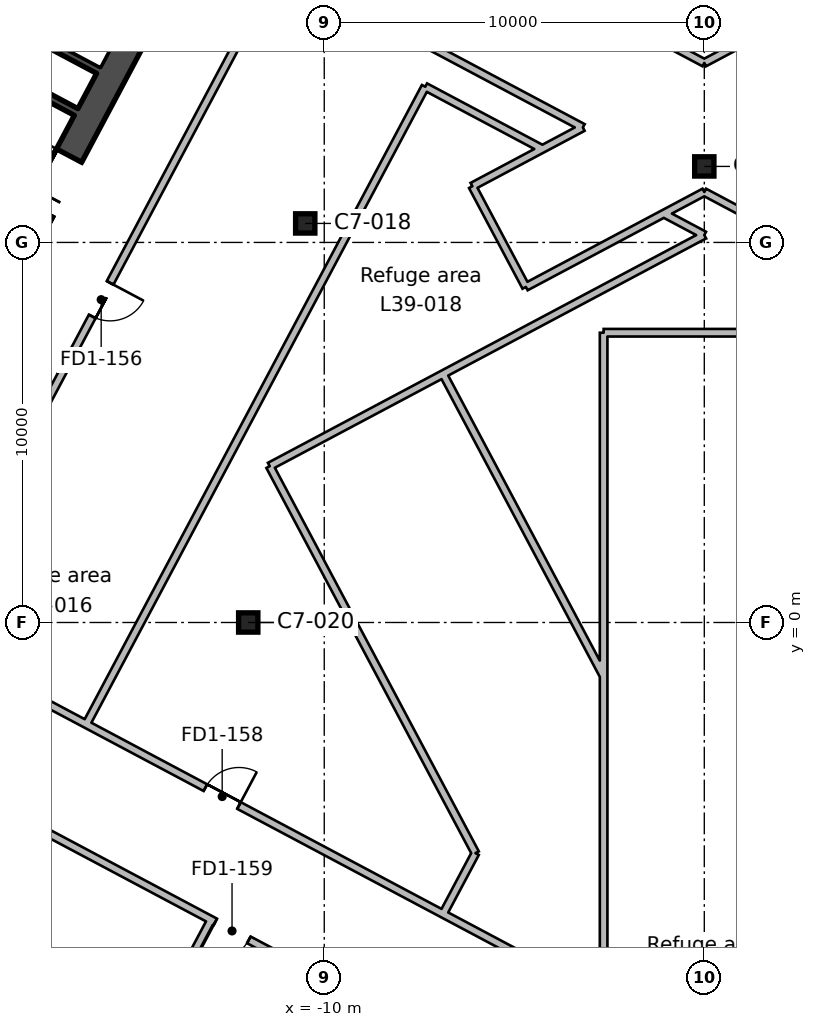
"""IFC4 building model, lengths in metres.
Left out: names, types, materials, properties, quantities, classifications, styles, units other than length and angle.
Written with IfcOpenShell. Run it as: python <this file> out.ifc"""

import sys

from ifc_helpers import new_model, si_unit, direction, frame, frame_2d, origin, origin_2d, place, context, subcontext, project, spatial, rectangle, hollow_rectangle, extrude, element, fill, save


model = new_model("IFC4")
c1 = context("Model", 3, precision=1e-05, world=origin(), true_north=direction((0.0, 1.0)))
c2 = subcontext(c1, "Body", "Model", "MODEL_VIEW")
j1 = project(units=[si_unit("LENGTHUNIT", "METRE"), si_unit("PLANEANGLEUNIT", "RADIAN")], contexts=[c1])
p1 = place(None, origin())
s1 = spatial("IfcSite", under=j1, at=p1, CompositionType="ELEMENT")
p2 = place(p1, origin())
s2 = spatial("IfcBuilding", under=s1, at=p2, CompositionType="ELEMENT")
p3 = place(p2, frame((0.0, 0.0, 183.6)))
s3 = spatial("IfcBuildingStorey", under=s2, at=p3, CompositionType="ELEMENT", Elevation=183.6)
for number, where, z_axis, x_axis in (
    (1, (-12.0, 0.0, 0.0), (0.0, 0.0, 1.0), (1.0, 0.0, 0.0)),
    (2, (-10.5, 10.5, 0.0), (0.0, 0.0, 1.0), (1.0, 0.0, 0.0)),
    (3, (0.0, 12.0, 0.0), (0.0, 0.0, 1.0), (1.0, 0.0, 0.0)),
):
    element("IfcColumn", number, at=place(p3, frame(where, z_axis=z_axis, x_axis=x_axis)), inside=s3, PredefinedType="COLUMN", context=c2, shape_type="SweptSolid", body=[
        extrude(hollow_rectangle(XDim=0.508, YDim=0.508, WallThickness=0.012, InnerFilletRadius=0.006, OuterFilletRadius=0.018, at=origin_2d()), origin(), (0.0, 0.0, 1.0), 6.0),
    ])
p4 = place(p3, frame((-13.498, 18.333, 0.0), z_axis=(0.0, 0.0, 1.0), x_axis=(-0.469469918705, -0.88294846703, 0.0)))
e4 = element("IfcWall", 4, at=p4, inside=s3, PredefinedType="SHEAR", context=c2, shape_type="SweptSolid", body=[
    extrude(rectangle(XDim=19.7, YDim=0.75, at=frame_2d((9.85, 0.0))), origin(), (0.0, 0.0, 1.0), 6.0),
])
p5 = place(p4, frame((6.85, 0.0, 0.0)))
e5 = element("IfcOpeningElement", 5, at=p5, cuts=e4, PredefinedType="OPENING", context=c2, shape_type="SweptSolid", body=[
    extrude(rectangle(XDim=2.4, YDim=2.4, at=frame_2d((1.2, 1.2))), frame((0.0, 0.385, 0.0), z_axis=(0.0, -1.0, 0.0), x_axis=(1.0, 0.0, 0.0)), (0.0, 0.0, 1.0), 0.77),
])
p6 = place(p3, frame((-15.942, 14.536, 0.0), z_axis=(0.0, 0.0, 1.0), x_axis=(-0.882946947542, 0.469472776449, 0.0)))
e6 = element("IfcWall", 6, at=p6, inside=s3, PredefinedType="SHEAR", context=c2, shape_type="SweptSolid", body=[
    extrude(rectangle(XDim=8.0, YDim=0.2, at=frame_2d((4.0, 0.0))), origin(), (0.0, 0.0, 1.0), 6.0),
])
p7 = place(p3, frame((-16.529, 13.432, 0.0), z_axis=(0.0, 0.0, 1.0), x_axis=(-0.88295287151, 0.469461634952, 0.0)))
e7 = element("IfcWall", 7, at=p7, inside=s3, PredefinedType="SHEAR", context=c2, shape_type="SweptSolid", body=[
    extrude(rectangle(XDim=8.0, YDim=0.2, at=frame_2d((4.0, 0.0))), origin(), (0.0, 0.0, 1.0), 6.0),
])
p8 = place(p3, frame((-47.73, 40.102, 0.0), z_axis=(0.0, 0.0, 1.0), x_axis=(0.882942458257, -0.469481219441, 0.0)))
e8 = element("IfcWall", 8, at=p8, inside=s3, PredefinedType="PARTITIONING", context=c2, shape_type="SweptSolid", body=[
    extrude(rectangle(XDim=54.058, YDim=0.2, at=frame_2d((27.029, 0.0))), origin(), (0.0, 0.0, 1.0), 5.55),
])
p9 = place(p8, frame((38.665, 0.0, 0.0)))
e9 = element("IfcOpeningElement", 9, at=p9, cuts=e8, PredefinedType="OPENING", context=c2, shape_type="SweptSolid", body=[
    extrude(rectangle(XDim=1.0, YDim=2.1, at=frame_2d((0.5, 1.05))), frame((0.0, 0.11, 0.0), z_axis=(0.0, -1.0, 0.0), x_axis=(1.0, 0.0, 0.0)), (0.0, 0.0, 1.0), 0.22),
])
p10 = place(p8, frame((26.766, 0.0, 0.0)))
e10 = element("IfcOpeningElement", 10, at=p10, cuts=e8, PredefinedType="OPENING", context=c2, shape_type="SweptSolid", body=[
    extrude(rectangle(XDim=1.0, YDim=2.1, at=frame_2d((0.5, 1.05))), frame((0.0, 0.11, 0.0), z_axis=(0.0, -1.0, 0.0), x_axis=(1.0, 0.0, 0.0)), (0.0, 0.0, 1.0), 0.22),
])
p11 = place(p8, frame((20.465, 0.0, 0.0)))
e11 = element("IfcOpeningElement", 11, at=p11, cuts=e8, PredefinedType="OPENING", context=c2, shape_type="SweptSolid", body=[
    extrude(rectangle(XDim=1.0, YDim=2.1, at=frame_2d((0.5, 1.05))), frame((0.0, 0.11, 0.0), z_axis=(0.0, -1.0, 0.0), x_axis=(1.0, 0.0, 0.0)), (0.0, 0.0, 1.0), 0.22),
])
p12 = place(p8, frame((14.866, 0.0, 0.0)))
e12 = element("IfcOpeningElement", 12, at=p12, cuts=e8, PredefinedType="OPENING", context=c2, shape_type="SweptSolid", body=[
    extrude(rectangle(XDim=1.0, YDim=2.1, at=frame_2d((0.5, 1.05))), frame((0.0, 0.11, 0.0), z_axis=(0.0, -1.0, 0.0), x_axis=(1.0, 0.0, 0.0)), (0.0, 0.0, 1.0), 0.22),
])
p13 = place(p3, frame((0.0, 14.723, 0.0), z_axis=(0.0, 0.0, 1.0), x_axis=(0.882950329887, 0.469466415149, 0.0)))
e13 = element("IfcWall", 13, at=p13, inside=s3, PredefinedType="PARTITIONING", context=c2, shape_type="SweptSolid", body=[
    extrude(rectangle(XDim=49.288, YDim=0.2, at=frame_2d((24.644, 0.0))), origin(), (0.0, 0.0, 1.0), 5.55),
])
p14 = place(p13, frame((23.95, 0.0, 0.0)))
e14 = element("IfcOpeningElement", 14, at=p14, cuts=e13, PredefinedType="OPENING", context=c2, shape_type="SweptSolid", body=[
    extrude(rectangle(XDim=1.0, YDim=2.1, at=frame_2d((0.5, 1.05))), frame((0.0, 0.11, 0.0), z_axis=(0.0, -1.0, 0.0), x_axis=(1.0, 0.0, 0.0)), (0.0, 0.0, 1.0), 0.22),
])
p15 = place(p13, frame((17.95, 0.0, 0.0)))
e15 = element("IfcOpeningElement", 15, at=p15, cuts=e13, PredefinedType="OPENING", context=c2, shape_type="SweptSolid", body=[
    extrude(rectangle(XDim=1.0, YDim=2.1, at=frame_2d((0.5, 1.05))), frame((0.0, 0.11, 0.0), z_axis=(0.0, -1.0, 0.0), x_axis=(1.0, 0.0, 0.0)), (0.0, 0.0, 1.0), 0.22),
])
p16 = place(p13, frame((13.55, 0.0, 0.0)))
e16 = element("IfcOpeningElement", 16, at=p16, cuts=e13, PredefinedType="OPENING", context=c2, shape_type="SweptSolid", body=[
    extrude(rectangle(XDim=1.0, YDim=2.1, at=frame_2d((0.5, 1.05))), frame((0.0, 0.11, 0.0), z_axis=(0.0, -1.0, 0.0), x_axis=(1.0, 0.0, 0.0)), (0.0, 0.0, 1.0), 0.22),
])
p17 = place(p3, frame((-8.144, -10.393, 0.0), z_axis=(0.0, 0.0, 1.0), x_axis=(-0.882945087791, 0.469476274102, 0.0)))
e17 = element("IfcWall", 17, at=p17, inside=s3, PredefinedType="PARTITIONING", context=c2, shape_type="SweptSolid", body=[
    extrude(rectangle(XDim=43.66, YDim=0.2, at=frame_2d((21.83, 0.0))), origin(), (0.0, 0.0, 1.0), 5.55),
])
p18 = place(p17, frame((32.25, 0.0, 0.0)))
e18 = element("IfcOpeningElement", 18, at=p18, cuts=e17, PredefinedType="OPENING", context=c2, shape_type="SweptSolid", body=[
    extrude(rectangle(XDim=1.0, YDim=2.1, at=frame_2d((0.5, 1.05))), frame((0.0, 0.11, 0.0), z_axis=(0.0, -1.0, 0.0), x_axis=(1.0, 0.0, 0.0)), (0.0, 0.0, 1.0), 0.22),
])
p19 = place(p17, frame((21.35, 0.0, 0.0)))
e19 = element("IfcOpeningElement", 19, at=p19, cuts=e17, PredefinedType="OPENING", context=c2, shape_type="SweptSolid", body=[
    extrude(rectangle(XDim=1.0, YDim=2.1, at=frame_2d((0.5, 1.05))), frame((0.0, 0.11, 0.0), z_axis=(0.0, -1.0, 0.0), x_axis=(1.0, 0.0, 0.0)), (0.0, 0.0, 1.0), 0.22),
])
p20 = place(p17, frame((14.95, 0.0, 0.0)))
e20 = element("IfcOpeningElement", 20, at=p20, cuts=e17, PredefinedType="OPENING", context=c2, shape_type="SweptSolid", body=[
    extrude(rectangle(XDim=1.0, YDim=2.1, at=frame_2d((0.5, 1.05))), frame((0.0, 0.11, 0.0), z_axis=(0.0, -1.0, 0.0), x_axis=(1.0, 0.0, 0.0)), (0.0, 0.0, 1.0), 0.22),
])
p21 = place(p17, frame((4.35, 0.0, 0.0)))
e21 = element("IfcOpeningElement", 21, at=p21, cuts=e17, PredefinedType="OPENING", context=c2, shape_type="SweptSolid", body=[
    extrude(rectangle(XDim=1.0, YDim=2.1, at=frame_2d((0.5, 1.05))), frame((0.0, 0.11, 0.0), z_axis=(0.0, -1.0, 0.0), x_axis=(1.0, 0.0, 0.0)), (0.0, 0.0, 1.0), 0.22),
])
p22 = place(p3, frame((-12.976, -7.824, 0.0), z_axis=(0.0, 0.0, 1.0), x_axis=(-0.469498413518, -0.882933315548, 0.0)))
e22 = element("IfcWall", 22, at=p22, inside=s3, PredefinedType="PARTITIONING", context=c2, shape_type="SweptSolid", body=[
    extrude(rectangle(XDim=8.2, YDim=0.2, at=frame_2d((4.1, 0.0))), origin(), (0.0, 0.0, 1.0), 5.55),
])
p23 = place(p3, frame((-15.353, -0.97, 0.0), z_axis=(0.0, 0.0, 1.0), x_axis=(0.469461347352, 0.882953024426, 0.0)))
e23 = element("IfcWall", 23, at=p23, inside=s3, PredefinedType="PARTITIONING", context=c2, shape_type="SweptSolid", body=[
    extrude(rectangle(XDim=17.064, YDim=0.2, at=frame_2d((8.532, 0.0))), origin(), (0.0, 0.0, 1.0), 5.55),
])
p24 = place(p3, frame((-7.342, 14.097, 0.0), z_axis=(0.0, 0.0, 1.0), x_axis=(0.883005616924, -0.469362419118, 0.0)))
e24 = element("IfcWall", 24, at=p24, inside=s3, PredefinedType="PARTITIONING", context=c2, shape_type="SweptSolid", body=[
    extrude(rectangle(XDim=3.475, YDim=0.2, at=frame_2d((1.737, 0.0))), origin(), (0.0, 0.0, 1.0), 5.55),
])
p25 = place(p3, frame((-15.353, -0.97, 0.0), z_axis=(0.0, 0.0, 1.0), x_axis=(-0.469573229387, -0.88289352826, 0.0)))
e25 = element("IfcWall", 25, at=p25, inside=s3, PredefinedType="PARTITIONING", context=c2, shape_type="SweptSolid", body=[
    extrude(rectangle(XDim=1.936, YDim=0.2, at=frame_2d((0.968, 0.0))), origin(), (0.0, 0.0, 1.0), 5.55),
])
p26 = place(p3, frame((-20.588, -0.379, 0.0), z_axis=(0.0, 0.0, 1.0), x_axis=(0.469489882812, 0.882937851685, 0.0)))
e26 = element("IfcWall", 26, at=p26, inside=s3, PredefinedType="PARTITIONING", context=c2, shape_type="SweptSolid", body=[
    extrude(rectangle(XDim=20.0, YDim=0.2, at=frame_2d((10.0, 0.0))), origin(), (0.0, 0.0, 1.0), 5.55),
])
p27 = place(p26, frame((9.55, 0.0, 0.0)))
e27 = element("IfcOpeningElement", 27, at=p27, cuts=e26, PredefinedType="OPENING", context=c2, shape_type="SweptSolid", body=[
    extrude(rectangle(XDim=1.0, YDim=2.1, at=frame_2d((0.5, 1.05))), frame((0.0, 0.11, 0.0), z_axis=(0.0, -1.0, 0.0), x_axis=(1.0, 0.0, 0.0)), (0.0, 0.0, 1.0), 0.22),
])
p28 = place(p3, frame((-11.198, 17.28, 0.0), z_axis=(0.0, 0.0, 1.0), x_axis=(0.882952451638, -0.469462424637, 0.0)))
e28 = element("IfcWall", 28, at=p28, inside=s3, PredefinedType="PARTITIONING", context=c2, shape_type="SweptSolid", body=[
    extrude(rectangle(XDim=9.064, YDim=0.2, at=frame_2d((4.532, 0.0))), origin(), (0.0, 0.0, 1.0), 5.55),
])
p29 = place(p3, frame((-6.873, 6.538, 0.0), z_axis=(0.0, 0.0, 1.0), x_axis=(-0.882996997183, -0.469378634969, 0.0)))
e29 = element("IfcWall", 29, at=p29, inside=s3, PredefinedType="PARTITIONING", context=c2, shape_type="SweptSolid", body=[
    extrude(rectangle(XDim=5.167, YDim=0.2, at=frame_2d((2.583, 0.0))), origin(), (0.0, 0.0, 1.0), 5.55),
])
p30 = place(p3, frame((-11.435, 4.113, 0.0), z_axis=(0.0, 0.0, 1.0), x_axis=(0.469480251476, -0.882942972946, 0.0)))
e30 = element("IfcWall", 30, at=p30, inside=s3, PredefinedType="PARTITIONING", context=c2, shape_type="SweptSolid", body=[
    extrude(rectangle(XDim=11.532, YDim=0.2, at=frame_2d((5.766, 0.0))), origin(), (0.0, 0.0, 1.0), 5.55),
])
p31 = place(p3, frame((-6.021, -6.069, 0.0), z_axis=(0.0, 0.0, 1.0), x_axis=(-0.469624131111, -0.882866453932, 0.0)))
e31 = element("IfcWall", 31, at=p31, inside=s3, PredefinedType="PARTITIONING", context=c2, shape_type="SweptSolid", body=[
    extrude(rectangle(XDim=1.814, YDim=0.2, at=frame_2d((0.907, 0.0))), origin(), (0.0, 0.0, 1.0), 5.55),
])
p32 = place(p3, frame((-1.063, 10.758, 0.0), z_axis=(0.0, 0.0, 1.0), x_axis=(0.883036930651, -0.469303504255, 0.0)))
e32 = element("IfcWall", 32, at=p32, inside=s3, PredefinedType="PARTITIONING", context=c2, shape_type="SweptSolid", body=[
    extrude(rectangle(XDim=1.204, YDim=0.2, at=frame_2d((0.602, 0.0))), origin(), (0.0, 0.0, 1.0), 5.55),
])
p33 = place(p3, frame((0.0, 10.193, 0.0), z_axis=(0.0, 0.0, 1.0), x_axis=(-0.882917481192, -0.469528190215, 0.0)))
e33 = element("IfcWall", 33, at=p33, inside=s3, PredefinedType="PARTITIONING", context=c2, shape_type="SweptSolid", body=[
    extrude(rectangle(XDim=7.784, YDim=0.2, at=frame_2d((3.892, 0.0))), origin(), (0.0, 0.0, 1.0), 5.55),
])
p34 = place(p3, frame((-2.649, -1.407, 0.0), z_axis=(0.0, 0.0, 1.0), x_axis=(-0.469441525693, 0.882963563209, 0.0)))
e34 = element("IfcWall", 34, at=p34, inside=s3, PredefinedType="PARTITIONING", context=c2, shape_type="SweptSolid", body=[
    extrude(rectangle(XDim=8.998, YDim=0.2, at=frame_2d((4.499, 0.0))), origin(), (0.0, 0.0, 1.0), 5.55),
])
p35 = place(p3, frame((-4.265, 12.456, 0.0), z_axis=(0.0, 0.0, 1.0), x_axis=(0.882943477621, 0.469479302341, 0.0)))
e35 = element("IfcWall", 35, at=p35, inside=s3, PredefinedType="PARTITIONING", context=c2, shape_type="SweptSolid", body=[
    extrude(rectangle(XDim=1.212, YDim=0.2, at=frame_2d((0.606, 0.0))), origin(), (0.0, 0.0, 1.0), 5.55),
])
p36 = place(p3, frame((-20.588, -0.379, 0.0), z_axis=(0.0, 0.0, 1.0), x_axis=(0.882951465933, -0.469464278521, 0.0)))
e36 = element("IfcWall", 36, at=p36, inside=s3, PredefinedType="PARTITIONING", context=c2, shape_type="SweptSolid", body=[
    extrude(rectangle(XDim=18.0, YDim=0.2, at=frame_2d((9.0, 0.0))), origin(), (0.0, 0.0, 1.0), 5.55),
])
p37 = place(p36, frame((8.45, 0.0, 0.0)))
e37 = element("IfcOpeningElement", 37, at=p37, cuts=e36, PredefinedType="OPENING", context=c2, shape_type="SweptSolid", body=[
    extrude(rectangle(XDim=1.0, YDim=2.1, at=frame_2d((0.5, 1.05))), frame((0.0, 0.11, 0.0), z_axis=(0.0, -1.0, 0.0), x_axis=(1.0, 0.0, 0.0)), (0.0, 0.0, 1.0), 0.22),
])
p38 = place(p3, frame((-1.075, 10.754, 0.0), z_axis=(0.0, 0.0, 1.0), x_axis=(-0.88295221972, -0.469462860822, 0.0)))
e38 = element("IfcWall", 38, at=p38, inside=s3, PredefinedType="PARTITIONING", context=c2, shape_type="SweptSolid", body=[
    extrude(rectangle(XDim=4.1, YDim=0.2, at=frame_2d((2.05, 0.0))), origin(), (0.0, 0.0, 1.0), 5.55),
])
p39 = place(p3, frame((-4.695, 8.829, 0.0), z_axis=(0.0, 0.0, 1.0), x_axis=(-0.469341661158, 0.883016650523, 0.0)))
e39 = element("IfcWall", 39, at=p39, inside=s3, PredefinedType="PARTITIONING", context=c2, shape_type="SweptSolid", body=[
    extrude(rectangle(XDim=3.0, YDim=0.2, at=frame_2d((1.5, 0.0))), origin(), (0.0, 0.0, 1.0), 5.55),
])
p40 = place(p3, frame((-6.103, 11.478, 0.0), z_axis=(0.0, 0.0, 1.0), x_axis=(0.882813423711, 0.469723811314, 0.0)))
e40 = element("IfcWall", 40, at=p40, inside=s3, PredefinedType="PARTITIONING", context=c2, shape_type="SweptSolid", body=[
    extrude(rectangle(XDim=2.082, YDim=0.2, at=frame_2d((1.041, 0.0))), origin(), (0.0, 0.0, 1.0), 5.55),
])
p41 = place(p3, frame((-2.649, 7.624, 0.0), z_axis=(0.0, 0.0, 1.0), x_axis=(0.0, -1.0, 0.0)))
e41 = element("IfcWall", 41, at=p41, inside=s3, PredefinedType="PARTITIONING", context=c2, shape_type="SweptSolid", body=[
    extrude(rectangle(XDim=8.921, YDim=0.2, at=frame_2d((4.46, 0.0))), origin(), (0.0, 0.0, 1.0), 5.55),
])
p42 = place(p3, frame((-2.649, 7.624, 0.0), z_axis=(0.0, 0.0, 1.0), x_axis=(1.0, 0.0, 0.0)))
e42 = element("IfcWall", 42, at=p42, inside=s3, PredefinedType="PARTITIONING", context=c2, shape_type="SweptSolid", body=[
    extrude(rectangle(XDim=5.298, YDim=0.2, at=frame_2d((2.649, 0.0))), origin(), (0.0, 0.0, 1.0), 5.55),
])
p43 = place(p3, frame((-2.649, -15.84, 0.0), z_axis=(0.0, 0.0, 1.0), x_axis=(0.0, 1.0, 0.0)))
e43 = element("IfcWall", 43, at=p43, inside=s3, PredefinedType="PARTITIONING", context=c2, shape_type="SweptSolid", body=[
    extrude(rectangle(XDim=14.543, YDim=0.2, at=frame_2d((7.271, 0.0))), origin(), (0.0, 0.0, 1.0), 5.55),
])
p44 = place(p3, frame((3.186, 9.632, 0.0), z_axis=(0.0, 0.0, 1.0), x_axis=(-0.882970255793, 0.469428937524, 0.0)))
e44 = element("IfcWall", 44, at=p44, inside=s3, PredefinedType="PARTITIONING", context=c2, shape_type="SweptSolid", body=[
    extrude(rectangle(XDim=3.608, YDim=0.2, at=frame_2d((1.804, 0.0))), origin(), (0.0, 0.0, 1.0), 5.55),
])
p45 = place(p3, frame((0.0, 11.326, 0.0), z_axis=(0.0, 0.0, 1.0), x_axis=(-0.882791016648, -0.469765921418, 0.0)))
e45 = element("IfcWall", 45, at=p45, inside=s3, PredefinedType="PARTITIONING", context=c2, shape_type="SweptSolid", body=[
    extrude(rectangle(XDim=1.218, YDim=0.2, at=frame_2d((0.609, 0.0))), origin(), (0.0, 0.0, 1.0), 5.55),
])
p46 = place(p5, frame((2.4, 0.0, 0.0), z_axis=(0.0, 0.0, 1.0), x_axis=(-1.0, 0.0, 0.0)))
e46 = element("IfcDoor", 46, at=p46, inside=s3, OperationType="DOUBLE_DOOR_SINGLE_SWING", PredefinedType="DOOR", context=c2, shape_type="SweptSolid", body=[
    extrude(rectangle(XDim=2.4, YDim=2.4, at=frame_2d((1.2, 1.2))), frame((0.0, 0.025, 0.0), z_axis=(0.0, -1.0, 0.0), x_axis=(1.0, 0.0, 0.0)), (0.0, 0.0, 1.0), 0.05),
])
fill(e5, e46)
p47 = place(p27, frame((1.0, 0.0, 0.0), z_axis=(0.0, 0.0, 1.0), x_axis=(-1.0, 0.0, 0.0)))
e47 = element("IfcDoor", 47, at=p47, inside=s3, OperationType="SINGLE_SWING_LEFT", PredefinedType="DOOR", context=c2, shape_type="SweptSolid", body=[
    extrude(rectangle(XDim=1.0, YDim=2.1, at=frame_2d((0.5, 1.05))), frame((0.0, 0.025, 0.0), z_axis=(0.0, -1.0, 0.0), x_axis=(1.0, 0.0, 0.0)), (0.0, 0.0, 1.0), 0.05),
])
fill(e27, e47)
p48 = place(p37, origin())
e48 = element("IfcDoor", 48, at=p48, inside=s3, OperationType="SINGLE_SWING_RIGHT", PredefinedType="DOOR", context=c2, shape_type="SweptSolid", body=[
    extrude(rectangle(XDim=1.0, YDim=2.1, at=frame_2d((0.5, 1.05))), frame((0.0, 0.025, 0.0), z_axis=(0.0, -1.0, 0.0), x_axis=(1.0, 0.0, 0.0)), (0.0, 0.0, 1.0), 0.05),
])
fill(e37, e48)
p49 = place(p21, origin())
e49 = element("IfcDoor", 49, at=p49, inside=s3, OperationType="SINGLE_SWING_RIGHT", PredefinedType="DOOR", context=c2, shape_type="SweptSolid", body=[
    extrude(rectangle(XDim=1.0, YDim=2.1, at=frame_2d((0.5, 1.05))), frame((0.0, 0.025, 0.0), z_axis=(0.0, -1.0, 0.0), x_axis=(1.0, 0.0, 0.0)), (0.0, 0.0, 1.0), 0.05),
])
fill(e21, e49)
save(model, sys.argv[1])
